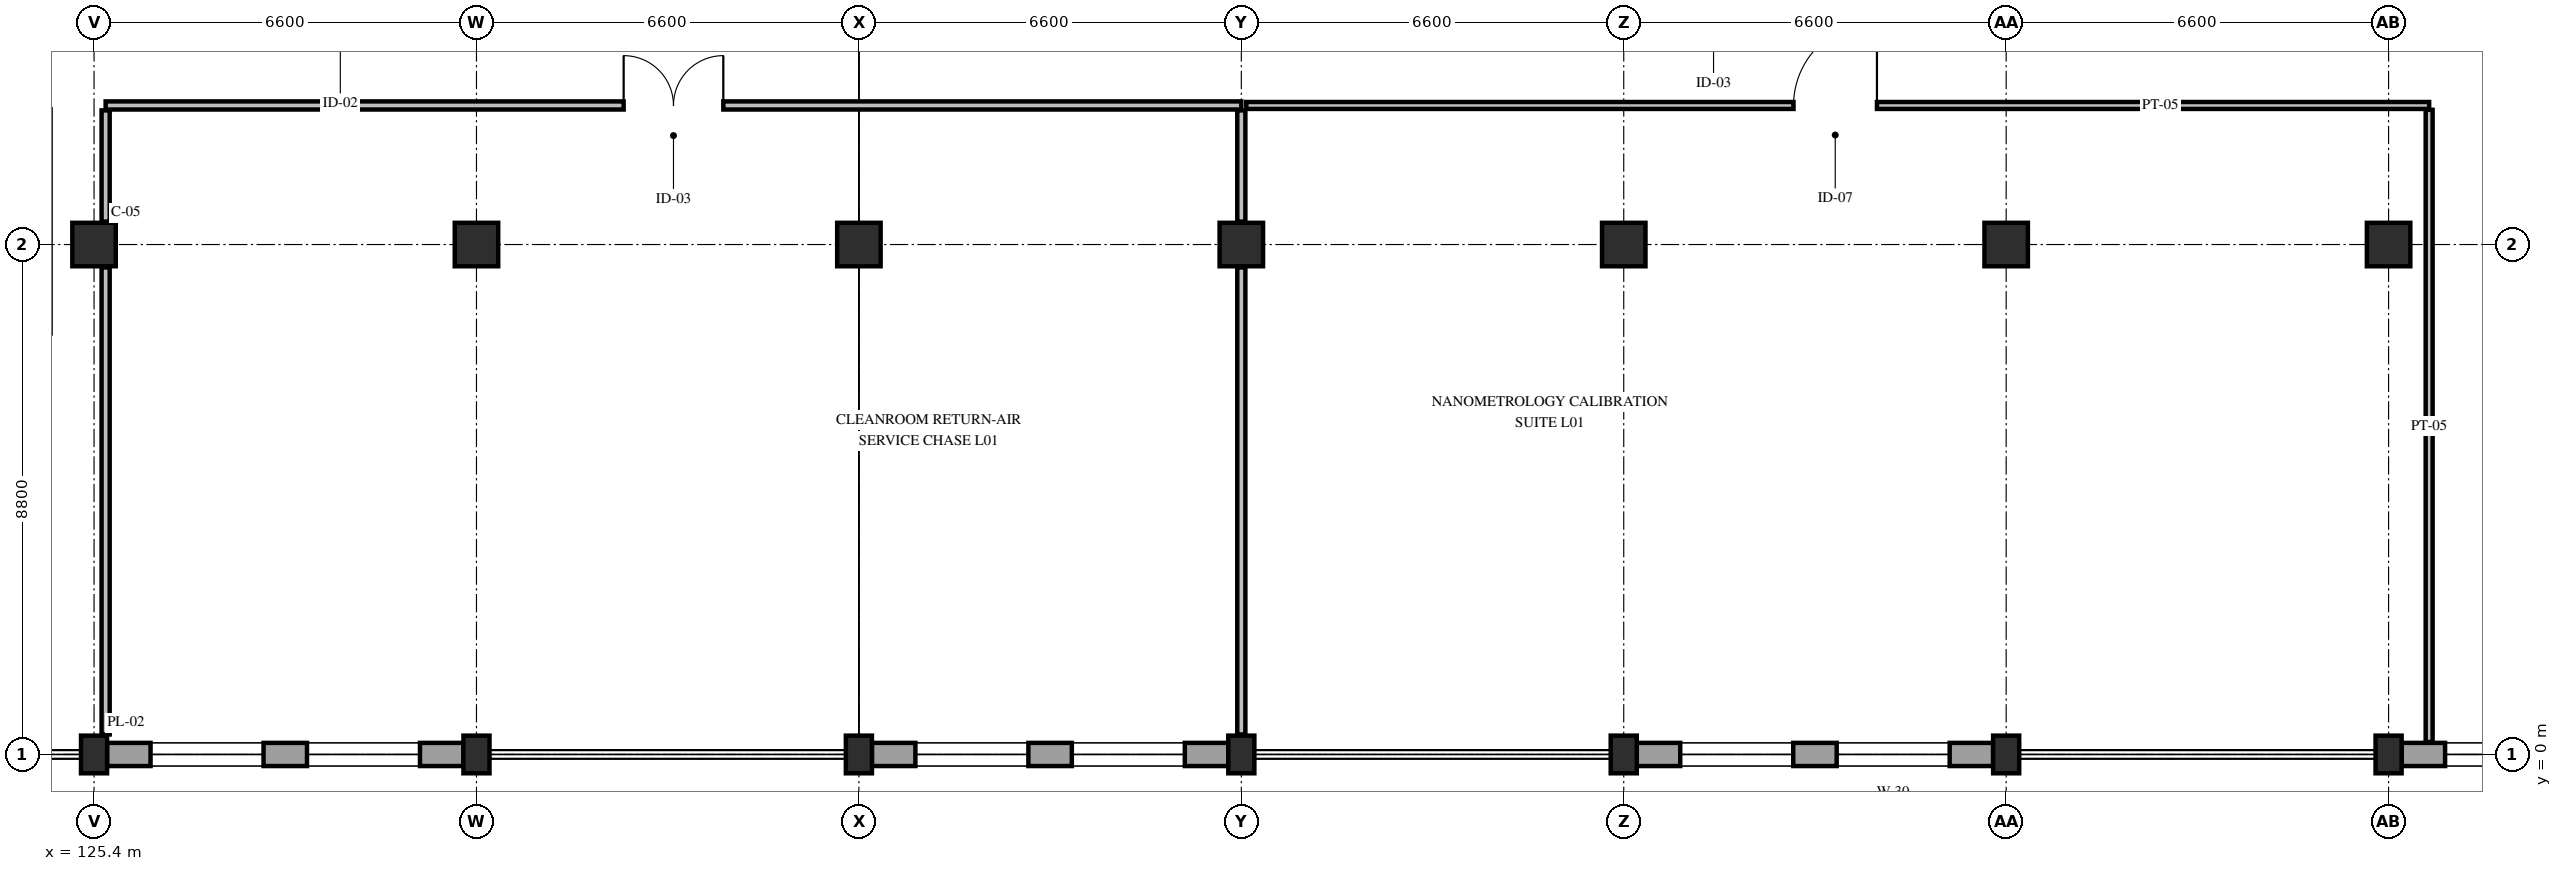
"""IFC4 building model, lengths in metres.
Left out: names, types, materials, properties, quantities, classifications, styles, units other than length and angle.
Written with IfcOpenShell. Run it as: python <this file> out.ifc"""

import sys

from ifc_helpers import new_model, si_unit, direction, frame, frame_2d, origin, origin_2d, place, context, subcontext, project, spatial, rectangle, extrude, element, fill, save


model = new_model("IFC4")
c1 = context("Model", 3, precision=1e-05, world=origin(), true_north=direction((0.0, 1.0)))
c2 = subcontext(c1, "Body", "Model", "MODEL_VIEW")
j1 = project(units=[si_unit("LENGTHUNIT", "METRE"), si_unit("PLANEANGLEUNIT", "RADIAN")], contexts=[c1])
p1 = place(None, origin())
s1 = spatial("IfcSite", under=j1, at=p1, CompositionType="ELEMENT")
p2 = place(p1, origin())
s2 = spatial("IfcBuilding", under=s1, at=p2, CompositionType="ELEMENT")
p3 = place(p2, frame((0.0, 0.0, 5.4)))
s3 = spatial("IfcBuildingStorey", under=s2, at=p3, CompositionType="ELEMENT", Elevation=5.4)
p4 = place(p3, frame((125.4, 0.0, 0.0), z_axis=(0.0, 0.0, 1.0), x_axis=(1.0, 0.0, 0.0)))
e1 = element("IfcColumn", 1, at=p4, inside=s3, PredefinedType="PILASTER", context=c2, shape_type="SweptSolid", body=[
    extrude(rectangle(XDim=0.45, YDim=0.65, at=origin_2d()), origin(), (0.0, 0.0, 1.0), 4.8),
])
p5 = place(p3, frame((125.4, 8.8, 0.0), z_axis=(0.0, 0.0, 1.0), x_axis=(1.0, 0.0, 0.0)))
e2 = element("IfcColumn", 2, at=p5, inside=s3, PredefinedType="COLUMN", context=c2, shape_type="SweptSolid", body=[
    extrude(rectangle(XDim=0.75, YDim=0.75, at=origin_2d()), origin(), (0.0, 0.0, 1.0), 4.8),
])
p6 = place(p3, frame((132.0, 0.0, 0.0), z_axis=(0.0, 0.0, 1.0), x_axis=(1.0, 0.0, 0.0)))
e3 = element("IfcColumn", 3, at=p6, inside=s3, PredefinedType="PILASTER", context=c2, shape_type="SweptSolid", body=[
    extrude(rectangle(XDim=0.45, YDim=0.65, at=origin_2d()), origin(), (0.0, 0.0, 1.0), 4.8),
])
p7 = place(p3, frame((132.0, 8.8, 0.0), z_axis=(0.0, 0.0, 1.0), x_axis=(1.0, 0.0, 0.0)))
e4 = element("IfcColumn", 4, at=p7, inside=s3, PredefinedType="COLUMN", context=c2, shape_type="SweptSolid", body=[
    extrude(rectangle(XDim=0.75, YDim=0.75, at=origin_2d()), origin(), (0.0, 0.0, 1.0), 4.8),
])
p8 = place(p3, frame((138.6, 0.0, 0.0), z_axis=(0.0, 0.0, 1.0), x_axis=(1.0, 0.0, 0.0)))
e5 = element("IfcColumn", 5, at=p8, inside=s3, PredefinedType="PILASTER", context=c2, shape_type="SweptSolid", body=[
    extrude(rectangle(XDim=0.45, YDim=0.65, at=origin_2d()), origin(), (0.0, 0.0, 1.0), 4.8),
])
p9 = place(p3, frame((138.6, 8.8, 0.0), z_axis=(0.0, 0.0, 1.0), x_axis=(1.0, 0.0, 0.0)))
e6 = element("IfcColumn", 6, at=p9, inside=s3, PredefinedType="COLUMN", context=c2, shape_type="SweptSolid", body=[
    extrude(rectangle(XDim=0.75, YDim=0.75, at=origin_2d()), origin(), (0.0, 0.0, 1.0), 4.8),
])
p10 = place(p3, frame((145.2, 0.0, 0.0), z_axis=(0.0, 0.0, 1.0), x_axis=(1.0, 0.0, 0.0)))
e7 = element("IfcColumn", 7, at=p10, inside=s3, PredefinedType="PILASTER", context=c2, shape_type="SweptSolid", body=[
    extrude(rectangle(XDim=0.45, YDim=0.65, at=origin_2d()), origin(), (0.0, 0.0, 1.0), 4.8),
])
p11 = place(p3, frame((145.2, 8.8, 0.0), z_axis=(0.0, 0.0, 1.0), x_axis=(1.0, 0.0, 0.0)))
e8 = element("IfcColumn", 8, at=p11, inside=s3, PredefinedType="COLUMN", context=c2, shape_type="SweptSolid", body=[
    extrude(rectangle(XDim=0.75, YDim=0.75, at=origin_2d()), origin(), (0.0, 0.0, 1.0), 4.8),
])
p12 = place(p3, frame((151.8, 0.0, 0.0), z_axis=(0.0, 0.0, 1.0), x_axis=(1.0, 0.0, 0.0)))
e9 = element("IfcColumn", 9, at=p12, inside=s3, PredefinedType="PILASTER", context=c2, shape_type="SweptSolid", body=[
    extrude(rectangle(XDim=0.45, YDim=0.65, at=origin_2d()), origin(), (0.0, 0.0, 1.0), 4.8),
])
p13 = place(p3, frame((151.8, 8.8, 0.0), z_axis=(0.0, 0.0, 1.0), x_axis=(1.0, 0.0, 0.0)))
e10 = element("IfcColumn", 10, at=p13, inside=s3, PredefinedType="COLUMN", context=c2, shape_type="SweptSolid", body=[
    extrude(rectangle(XDim=0.75, YDim=0.75, at=origin_2d()), origin(), (0.0, 0.0, 1.0), 4.8),
])
p14 = place(p3, frame((158.4, 0.0, 0.0), z_axis=(0.0, 0.0, 1.0), x_axis=(1.0, 0.0, 0.0)))
e11 = element("IfcColumn", 11, at=p14, inside=s3, PredefinedType="PILASTER", context=c2, shape_type="SweptSolid", body=[
    extrude(rectangle(XDim=0.45, YDim=0.65, at=origin_2d()), origin(), (0.0, 0.0, 1.0), 4.8),
])
p15 = place(p3, frame((158.4, 8.8, 0.0), z_axis=(0.0, 0.0, 1.0), x_axis=(1.0, 0.0, 0.0)))
e12 = element("IfcColumn", 12, at=p15, inside=s3, PredefinedType="COLUMN", context=c2, shape_type="SweptSolid", body=[
    extrude(rectangle(XDim=0.75, YDim=0.75, at=origin_2d()), origin(), (0.0, 0.0, 1.0), 4.8),
])
p16 = place(p3, frame((165.0, 0.0, 0.0), z_axis=(0.0, 0.0, 1.0), x_axis=(1.0, 0.0, 0.0)))
e13 = element("IfcColumn", 13, at=p16, inside=s3, PredefinedType="PILASTER", context=c2, shape_type="SweptSolid", body=[
    extrude(rectangle(XDim=0.45, YDim=0.65, at=origin_2d()), origin(), (0.0, 0.0, 1.0), 4.8),
])
p17 = place(p3, frame((165.0, 8.8, 0.0), z_axis=(0.0, 0.0, 1.0), x_axis=(1.0, 0.0, 0.0)))
e14 = element("IfcColumn", 14, at=p17, inside=s3, PredefinedType="COLUMN", context=c2, shape_type="SweptSolid", body=[
    extrude(rectangle(XDim=0.75, YDim=0.75, at=origin_2d()), origin(), (0.0, 0.0, 1.0), 4.8),
])
p18 = place(p3, frame((171.375, 0.0, 0.0), z_axis=(0.0, 0.0, 1.0), x_axis=(-1.0, 0.0, 0.0)))
e15 = element("IfcWall", 15, at=p18, inside=s3, PredefinedType="STANDARD", context=c2, shape_type="SweptSolid", body=[
    extrude(rectangle(XDim=6.15, YDim=0.4, at=frame_2d((3.075, 0.0))), origin(), (0.0, 0.0, 1.0), 3.98),
])
p19 = place(p18, frame((0.75, 0.0, 0.85)))
e16 = element("IfcOpeningElement", 16, at=p19, cuts=e15, PredefinedType="OPENING", context=c2, shape_type="SweptSolid", body=[
    extrude(rectangle(XDim=1.95, YDim=2.04, at=frame_2d((0.975, 1.02))), frame((0.0, 0.215, 0.0), z_axis=(0.0, -1.0, 0.0), x_axis=(1.0, 0.0, 0.0)), (0.0, 0.0, 1.0), 0.43),
])
p20 = place(p18, frame((3.45, 0.0, 0.85)))
e17 = element("IfcOpeningElement", 17, at=p20, cuts=e15, PredefinedType="OPENING", context=c2, shape_type="SweptSolid", body=[
    extrude(rectangle(XDim=1.95, YDim=2.04, at=frame_2d((0.975, 1.02))), frame((0.0, 0.215, 0.0), z_axis=(0.0, -1.0, 0.0), x_axis=(1.0, 0.0, 0.0)), (0.0, 0.0, 1.0), 0.43),
])
p21 = place(p3, frame((158.175, 0.0, 0.0), z_axis=(0.0, 0.0, 1.0), x_axis=(-1.0, 0.0, 0.0)))
e18 = element("IfcWall", 18, at=p21, inside=s3, PredefinedType="STANDARD", context=c2, shape_type="SweptSolid", body=[
    extrude(rectangle(XDim=6.15, YDim=0.4, at=frame_2d((3.075, 0.0))), origin(), (0.0, 0.0, 1.0), 3.98),
])
p22 = place(p21, frame((0.75, 0.0, 0.85)))
e19 = element("IfcOpeningElement", 19, at=p22, cuts=e18, PredefinedType="OPENING", context=c2, shape_type="SweptSolid", body=[
    extrude(rectangle(XDim=1.95, YDim=2.04, at=frame_2d((0.975, 1.02))), frame((0.0, 0.215, 0.0), z_axis=(0.0, -1.0, 0.0), x_axis=(1.0, 0.0, 0.0)), (0.0, 0.0, 1.0), 0.43),
])
p23 = place(p21, frame((3.45, 0.0, 0.85)))
e20 = element("IfcOpeningElement", 20, at=p23, cuts=e18, PredefinedType="OPENING", context=c2, shape_type="SweptSolid", body=[
    extrude(rectangle(XDim=1.95, YDim=2.04, at=frame_2d((0.975, 1.02))), frame((0.0, 0.215, 0.0), z_axis=(0.0, -1.0, 0.0), x_axis=(1.0, 0.0, 0.0)), (0.0, 0.0, 1.0), 0.43),
])
p24 = place(p3, frame((144.975, 0.0, 0.0), z_axis=(0.0, 0.0, 1.0), x_axis=(-1.0, 0.0, 0.0)))
e21 = element("IfcWall", 21, at=p24, inside=s3, PredefinedType="STANDARD", context=c2, shape_type="SweptSolid", body=[
    extrude(rectangle(XDim=6.15, YDim=0.4, at=frame_2d((3.075, 0.0))), origin(), (0.0, 0.0, 1.0), 3.98),
])
p25 = place(p24, frame((0.75, 0.0, 0.85)))
e22 = element("IfcOpeningElement", 22, at=p25, cuts=e21, PredefinedType="OPENING", context=c2, shape_type="SweptSolid", body=[
    extrude(rectangle(XDim=1.95, YDim=2.04, at=frame_2d((0.975, 1.02))), frame((0.0, 0.215, 0.0), z_axis=(0.0, -1.0, 0.0), x_axis=(1.0, 0.0, 0.0)), (0.0, 0.0, 1.0), 0.43),
])
p26 = place(p24, frame((3.45, 0.0, 0.85)))
e23 = element("IfcOpeningElement", 23, at=p26, cuts=e21, PredefinedType="OPENING", context=c2, shape_type="SweptSolid", body=[
    extrude(rectangle(XDim=1.95, YDim=2.04, at=frame_2d((0.975, 1.02))), frame((0.0, 0.215, 0.0), z_axis=(0.0, -1.0, 0.0), x_axis=(1.0, 0.0, 0.0)), (0.0, 0.0, 1.0), 0.43),
])
p27 = place(p3, frame((131.775, 0.0, 0.0), z_axis=(0.0, 0.0, 1.0), x_axis=(-1.0, 0.0, 0.0)))
e24 = element("IfcWall", 24, at=p27, inside=s3, PredefinedType="STANDARD", context=c2, shape_type="SweptSolid", body=[
    extrude(rectangle(XDim=6.15, YDim=0.4, at=frame_2d((3.075, 0.0))), origin(), (0.0, 0.0, 1.0), 3.98),
])
p28 = place(p27, frame((0.75, 0.0, 0.85)))
e25 = element("IfcOpeningElement", 25, at=p28, cuts=e24, PredefinedType="OPENING", context=c2, shape_type="SweptSolid", body=[
    extrude(rectangle(XDim=1.95, YDim=2.04, at=frame_2d((0.975, 1.02))), frame((0.0, 0.215, 0.0), z_axis=(0.0, -1.0, 0.0), x_axis=(1.0, 0.0, 0.0)), (0.0, 0.0, 1.0), 0.43),
])
p29 = place(p27, frame((3.45, 0.0, 0.85)))
e26 = element("IfcOpeningElement", 26, at=p29, cuts=e24, PredefinedType="OPENING", context=c2, shape_type="SweptSolid", body=[
    extrude(rectangle(XDim=1.95, YDim=2.04, at=frame_2d((0.975, 1.02))), frame((0.0, 0.215, 0.0), z_axis=(0.0, -1.0, 0.0), x_axis=(1.0, 0.0, 0.0)), (0.0, 0.0, 1.0), 0.43),
])
p30 = place(p3, frame((125.6, 11.2, 0.0), z_axis=(0.0, 0.0, 1.0), x_axis=(1.0, 0.0, 0.0)))
e27 = element("IfcWall", 27, at=p30, inside=s3, PredefinedType="PARTITIONING", context=c2, shape_type="SweptSolid", body=[
    extrude(rectangle(XDim=19.6, YDim=0.14, at=frame_2d((9.8, 0.0))), origin(), (0.0, 0.0, 1.0), 4.065),
])
p31 = place(p30, frame((8.94, 0.0, 0.0)))
e28 = element("IfcOpeningElement", 28, at=p31, cuts=e27, PredefinedType="OPENING", context=c2, shape_type="SweptSolid", body=[
    extrude(rectangle(XDim=1.72, YDim=2.35, at=frame_2d((0.86, 1.175))), frame((0.0, 0.085, 0.0), z_axis=(0.0, -1.0, 0.0), x_axis=(1.0, 0.0, 0.0)), (0.0, 0.0, 1.0), 0.17),
])
p32 = place(p3, frame((125.6, 0.345, 0.0), z_axis=(0.0, 0.0, 1.0), x_axis=(0.0, 1.0, 0.0)))
e29 = element("IfcWall", 29, at=p32, inside=s3, PredefinedType="PARTITIONING", context=c2, shape_type="SweptSolid", body=[
    extrude(rectangle(XDim=8.06, YDim=0.14, at=frame_2d((4.03, 0.0))), origin(), (0.0, 0.0, 1.0), 4.065),
])
p33 = place(p3, frame((125.6, 9.195, 0.0), z_axis=(0.0, 0.0, 1.0), x_axis=(0.0, 1.0, 0.0)))
e30 = element("IfcWall", 30, at=p33, inside=s3, PredefinedType="PARTITIONING", context=c2, shape_type="SweptSolid", body=[
    extrude(rectangle(XDim=1.92, YDim=0.14, at=frame_2d((0.96, 0.0))), origin(), (0.0, 0.0, 1.0), 4.065),
])
p34 = place(p3, frame((145.2, 0.345, 0.0), z_axis=(0.0, 0.0, 1.0), x_axis=(0.0, 1.0, 0.0)))
e31 = element("IfcWall", 31, at=p34, inside=s3, PredefinedType="PARTITIONING", context=c2, shape_type="SweptSolid", body=[
    extrude(rectangle(XDim=8.06, YDim=0.14, at=frame_2d((4.03, 0.0))), origin(), (0.0, 0.0, 1.0), 4.065),
])
p35 = place(p3, frame((145.2, 9.195, 0.0), z_axis=(0.0, 0.0, 1.0), x_axis=(0.0, 1.0, 0.0)))
e32 = element("IfcWall", 32, at=p35, inside=s3, PredefinedType="PARTITIONING", context=c2, shape_type="SweptSolid", body=[
    extrude(rectangle(XDim=1.92, YDim=0.14, at=frame_2d((0.96, 0.0))), origin(), (0.0, 0.0, 1.0), 4.065),
])
p36 = place(p3, frame((145.285, 11.2, 0.0), z_axis=(0.0, 0.0, 1.0), x_axis=(1.0, 0.0, 0.0)))
e33 = element("IfcWall", 33, at=p36, inside=s3, PredefinedType="PARTITIONING", context=c2, shape_type="SweptSolid", body=[
    extrude(rectangle(XDim=20.415, YDim=0.12, at=frame_2d((10.208, 0.0))), origin(), (0.0, 0.0, 1.0), 4.065),
])
p37 = place(p36, frame((9.445, 0.0, 0.0)))
e34 = element("IfcOpeningElement", 34, at=p37, cuts=e33, PredefinedType="OPENING", context=c2, shape_type="SweptSolid", body=[
    extrude(rectangle(XDim=1.44, YDim=2.25, at=frame_2d((0.72, 1.125))), frame((0.0, 0.075, 0.0), z_axis=(0.0, -1.0, 0.0), x_axis=(1.0, 0.0, 0.0)), (0.0, 0.0, 1.0), 0.15),
])
p38 = place(p3, frame((165.7, 0.215, 0.0), z_axis=(0.0, 0.0, 1.0), x_axis=(0.0, 1.0, 0.0)))
e35 = element("IfcWall", 35, at=p38, inside=s3, PredefinedType="PARTITIONING", context=c2, shape_type="SweptSolid", body=[
    extrude(rectangle(XDim=10.91, YDim=0.12, at=frame_2d((5.455, 0.0))), origin(), (0.0, 0.0, 1.0), 3.98),
])
p39 = place(p20, origin())
e36 = element("IfcWindow", 36, at=p39, inside=s3, PartitioningType="DOUBLE_PANEL_VERTICAL", PredefinedType="WINDOW", context=c2, shape_type="SweptSolid", body=[
    extrude(rectangle(XDim=1.95, YDim=2.04, at=frame_2d((0.975, 1.02))), frame((0.0, 0.03, 0.0), z_axis=(0.0, -1.0, 0.0), x_axis=(1.0, 0.0, 0.0)), (0.0, 0.0, 1.0), 0.06),
])
fill(e17, e36)
p40 = place(p22, origin())
e37 = element("IfcWindow", 37, at=p40, inside=s3, PartitioningType="DOUBLE_PANEL_VERTICAL", PredefinedType="WINDOW", context=c2, shape_type="SweptSolid", body=[
    extrude(rectangle(XDim=1.95, YDim=2.04, at=frame_2d((0.975, 1.02))), frame((0.0, 0.03, 0.0), z_axis=(0.0, -1.0, 0.0), x_axis=(1.0, 0.0, 0.0)), (0.0, 0.0, 1.0), 0.06),
])
fill(e19, e37)
p41 = place(p23, origin())
e38 = element("IfcWindow", 38, at=p41, inside=s3, PartitioningType="DOUBLE_PANEL_VERTICAL", PredefinedType="WINDOW", context=c2, shape_type="SweptSolid", body=[
    extrude(rectangle(XDim=1.95, YDim=2.04, at=frame_2d((0.975, 1.02))), frame((0.0, 0.03, 0.0), z_axis=(0.0, -1.0, 0.0), x_axis=(1.0, 0.0, 0.0)), (0.0, 0.0, 1.0), 0.06),
])
fill(e20, e38)
p42 = place(p25, origin())
e39 = element("IfcWindow", 39, at=p42, inside=s3, PartitioningType="DOUBLE_PANEL_VERTICAL", PredefinedType="WINDOW", context=c2, shape_type="SweptSolid", body=[
    extrude(rectangle(XDim=1.95, YDim=2.04, at=frame_2d((0.975, 1.02))), frame((0.0, 0.03, 0.0), z_axis=(0.0, -1.0, 0.0), x_axis=(1.0, 0.0, 0.0)), (0.0, 0.0, 1.0), 0.06),
])
fill(e22, e39)
p43 = place(p26, origin())
e40 = element("IfcWindow", 40, at=p43, inside=s3, PartitioningType="DOUBLE_PANEL_VERTICAL", PredefinedType="WINDOW", context=c2, shape_type="SweptSolid", body=[
    extrude(rectangle(XDim=1.95, YDim=2.04, at=frame_2d((0.975, 1.02))), frame((0.0, 0.03, 0.0), z_axis=(0.0, -1.0, 0.0), x_axis=(1.0, 0.0, 0.0)), (0.0, 0.0, 1.0), 0.06),
])
fill(e23, e40)
p44 = place(p28, origin())
e41 = element("IfcWindow", 41, at=p44, inside=s3, PartitioningType="DOUBLE_PANEL_VERTICAL", PredefinedType="WINDOW", context=c2, shape_type="SweptSolid", body=[
    extrude(rectangle(XDim=1.95, YDim=2.04, at=frame_2d((0.975, 1.02))), frame((0.0, 0.03, 0.0), z_axis=(0.0, -1.0, 0.0), x_axis=(1.0, 0.0, 0.0)), (0.0, 0.0, 1.0), 0.06),
])
fill(e25, e41)
p45 = place(p29, origin())
e42 = element("IfcWindow", 42, at=p45, inside=s3, PartitioningType="DOUBLE_PANEL_VERTICAL", PredefinedType="WINDOW", context=c2, shape_type="SweptSolid", body=[
    extrude(rectangle(XDim=1.95, YDim=2.04, at=frame_2d((0.975, 1.02))), frame((0.0, 0.03, 0.0), z_axis=(0.0, -1.0, 0.0), x_axis=(1.0, 0.0, 0.0)), (0.0, 0.0, 1.0), 0.06),
])
fill(e26, e42)
p46 = place(p31, origin())
e43 = element("IfcDoor", 43, at=p46, inside=s3, OperationType="DOUBLE_DOOR_SINGLE_SWING", PredefinedType="DOOR", context=c2, shape_type="SweptSolid", body=[
    extrude(rectangle(XDim=1.72, YDim=2.35, at=frame_2d((0.86, 1.175))), frame((0.0, 0.025, 0.0), z_axis=(0.0, -1.0, 0.0), x_axis=(1.0, 0.0, 0.0)), (0.0, 0.0, 1.0), 0.05),
])
fill(e28, e43)
p47 = place(p37, origin())
e44 = element("IfcDoor", 44, at=p47, inside=s3, OperationType="SINGLE_SWING_RIGHT", PredefinedType="DOOR", context=c2, shape_type="SweptSolid", body=[
    extrude(rectangle(XDim=1.44, YDim=2.25, at=frame_2d((0.72, 1.125))), frame((0.0, 0.025, 0.0), z_axis=(0.0, -1.0, 0.0), x_axis=(1.0, 0.0, 0.0)), (0.0, 0.0, 1.0), 0.05),
])
fill(e34, e44)
save(model, sys.argv[1])
